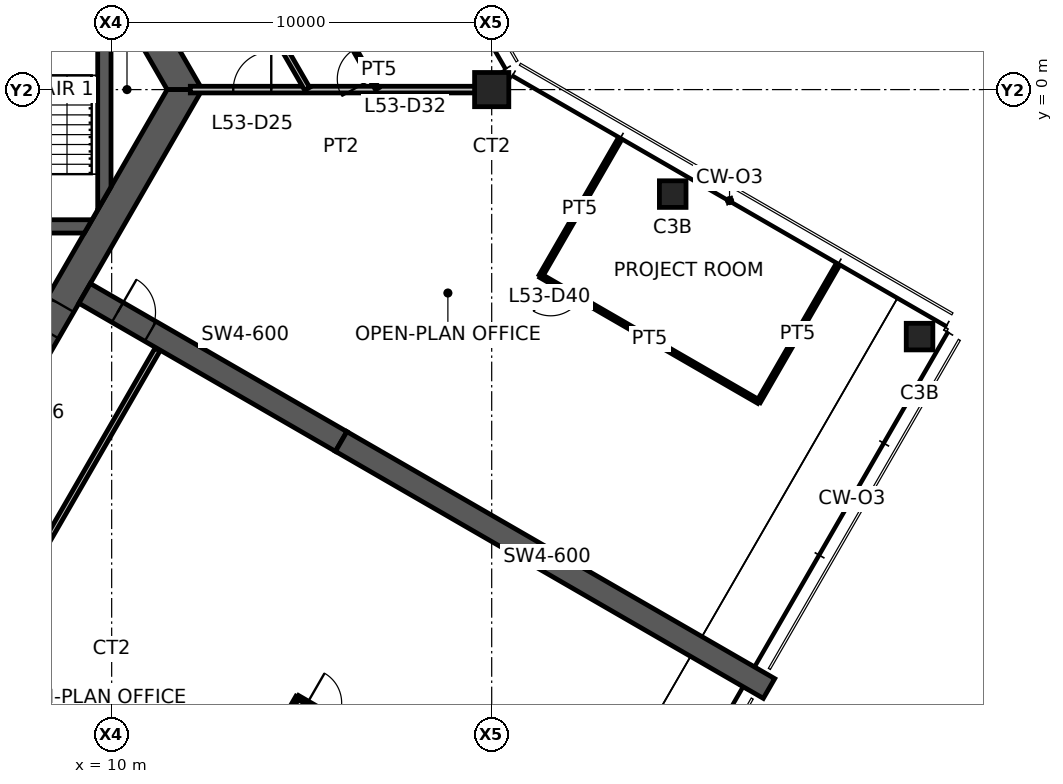
"""IFC4 building model, lengths in metres.
Left out: names, types, materials, properties, quantities, classifications, styles, units other than length and angle.
Written with IfcOpenShell. Run it as: python <this file> out.ifc"""

import sys

from ifc_helpers import new_model, si_unit, direction, frame, frame_2d, origin, origin_2d, place, context, subcontext, project, spatial, polyline, rectangle, hollow_rectangle, outline, extrude, element, fill, save


model = new_model("IFC4")
c1 = context("Model", 3, precision=1e-05, world=origin(), true_north=direction((0.0, 1.0)))
c2 = subcontext(c1, "Body", "Model", "MODEL_VIEW")
j1 = project(units=[si_unit("LENGTHUNIT", "METRE"), si_unit("PLANEANGLEUNIT", "RADIAN")], contexts=[c1])
p1 = place(None, origin())
s1 = spatial("IfcSite", under=j1, at=p1, CompositionType="ELEMENT")
p2 = place(p1, origin())
s2 = spatial("IfcBuilding", under=s1, at=p2, CompositionType="ELEMENT")
p3 = place(p2, frame((0.0, 0.0, 212.8)))
s3 = spatial("IfcBuildingStorey", under=s2, at=p3, CompositionType="ELEMENT", Elevation=212.8)
p4 = place(p3, frame((20.0, 0.0, 0.0), z_axis=(0.0, 0.0, 1.0), x_axis=(1.0, 0.0, 0.0)))
e1 = element("IfcColumn", 1, at=p4, inside=s3, PredefinedType="COLUMN", context=c2, shape_type="SweptSolid", body=[
    extrude(hollow_rectangle(XDim=0.9, YDim=0.9, WallThickness=0.09, at=origin_2d()), origin(), (0.0, 0.0, 1.0), 3.9),
])
for number, where, z_axis, x_axis in (
    (2, (24.763, -2.75, 0.0), (0.0, 0.0, 1.0), (1.0, 0.0, 0.0)),
    (3, (31.258, -6.5, 0.0), (0.0, 0.0, 1.0), (1.0, 0.0, 0.0)),
):
    element("IfcColumn", number, at=place(p3, frame(where, z_axis=z_axis, x_axis=x_axis)), inside=s3, PredefinedType="COLUMN", context=c2, shape_type="SweptSolid", body=[
        extrude(hollow_rectangle(XDim=0.7, YDim=0.7, WallThickness=0.036, at=origin_2d()), origin(), (0.0, 0.0, 1.0), 3.9),
    ])
p5 = place(p3, frame((11.922, 0.0, 0.0), z_axis=(0.0, 0.0, 1.0), x_axis=(-0.500004296715, 0.866022923061, 0.0)))
e4 = element("IfcWall", 4, at=p5, inside=s3, PredefinedType="SHEAR", context=c2, shape_type="SweptSolid", body=[
    extrude(outline(polyline([(-0.231, -0.4), (5.835, -0.4), (6.635, -0.4), (12.153, -0.4), (11.691, 0.4), (6.635, 0.4), (5.835, 0.4), (0.231, 0.4), (-0.231, -0.4)])), origin(), (0.0, 0.0, 1.0), 3.9),
])
p6 = place(p5, frame((5.835, 0.0, 0.0)))
e5 = element("IfcOpeningElement", 5, at=p6, cuts=e4, PredefinedType="OPENING", context=c2, shape_type="SweptSolid", body=[
    extrude(rectangle(XDim=0.8, YDim=2.1, at=frame_2d((0.4, 1.05))), frame((0.0, 0.41, 0.0), z_axis=(0.0, -1.0, 0.0), x_axis=(1.0, 0.0, 0.0)), (0.0, 0.0, 1.0), 0.82),
])
p7 = place(p3, frame((5.961, -10.325, 0.0), z_axis=(0.0, 0.0, 1.0), x_axis=(0.500004296715, 0.866022923061, 0.0)))
e6 = element("IfcWall", 6, at=p7, inside=s3, PredefinedType="SHEAR", context=c2, shape_type="SweptSolid", body=[
    extrude(outline(polyline([(-0.231, -0.4), (4.594, -0.4), (5.394, -0.4), (12.153, -0.4), (11.691, 0.4), (5.394, 0.4), (4.594, 0.4), (0.231, 0.4), (-0.231, -0.4)])), origin(), (0.0, 0.0, 1.0), 3.9),
])
p8 = place(p7, frame((4.594, 0.0, 0.0)))
e7 = element("IfcOpeningElement", 7, at=p8, cuts=e6, PredefinedType="OPENING", context=c2, shape_type="SweptSolid", body=[
    extrude(rectangle(XDim=0.8, YDim=2.1, at=frame_2d((0.4, 1.05))), frame((0.0, 0.41, 0.0), z_axis=(0.0, -1.0, 0.0), x_axis=(1.0, 0.0, 0.0)), (0.0, 0.0, 1.0), 0.82),
])
p9 = place(p3, frame((9.288, -5.363, 0.0), z_axis=(0.0, 0.0, 1.0), x_axis=(0.866031736626, -0.499989031036, 0.0)))
e8 = element("IfcWall", 8, at=p9, inside=s3, PredefinedType="SHEAR", context=c2, shape_type="SweptSolid", body=[
    extrude(rectangle(XDim=7.796, YDim=0.6, at=frame_2d((3.898, 0.0))), origin(), (0.0, 0.0, 1.0), 3.9),
])
p10 = place(p9, frame((1.0, 0.0, 0.0)))
e9 = element("IfcOpeningElement", 9, at=p10, cuts=e8, PredefinedType="OPENING", context=c2, shape_type="SweptSolid", body=[
    extrude(rectangle(XDim=1.0, YDim=2.1, at=frame_2d((0.5, 1.05))), frame((0.0, 0.31, 0.0), z_axis=(0.0, -1.0, 0.0), x_axis=(1.0, 0.0, 0.0)), (0.0, 0.0, 1.0), 0.62),
])
p11 = place(p3, frame((16.039, -9.26, 0.0), z_axis=(0.0, 0.0, 1.0), x_axis=(0.866024837091, -0.50000098154, 0.0)))
e10 = element("IfcWall", 10, at=p11, inside=s3, PredefinedType="SHEAR", context=c2, shape_type="SweptSolid", body=[
    extrude(rectangle(XDim=13.0, YDim=0.6, at=frame_2d((6.5, 0.0))), origin(), (0.0, 0.0, 1.0), 3.9),
])
p12 = place(p3, frame((1.425, -3.6, 0.0), z_axis=(0.0, 0.0, 1.0), x_axis=(1.0, 0.0, 0.0)))
e11 = element("IfcWall", 11, at=p12, inside=s3, PredefinedType="SHEAR", context=c2, shape_type="SweptSolid", body=[
    extrude(outline(polyline([(0.0, -0.175), (1.075, -0.175), (2.175, -0.175), (7.856, -0.175), (8.058, 0.175), (2.175, 0.175), (1.075, 0.175), (0.0, 0.175), (0.0, -0.175)])), origin(), (0.0, 0.0, 1.0), 3.9),
])
p13 = place(p12, frame((1.075, 0.0, 0.0)))
e12 = element("IfcOpeningElement", 12, at=p13, cuts=e11, PredefinedType="OPENING", context=c2, shape_type="SweptSolid", body=[
    extrude(rectangle(XDim=1.1, YDim=2.1, at=frame_2d((0.55, 1.05))), frame((0.0, 0.185, 0.0), z_axis=(0.0, -1.0, 0.0), x_axis=(1.0, 0.0, 0.0)), (0.0, 0.0, 1.0), 0.37),
])
p14 = place(p3, frame((9.808, -2.862, 0.0), z_axis=(0.0, 0.0, 1.0), x_axis=(0.0, 1.0, 0.0)))
e13 = element("IfcWall", 13, at=p14, inside=s3, PredefinedType="SHEAR", context=c2, shape_type="SweptSolid", body=[
    extrude(outline(polyline([(0.303, -0.175), (5.421, -0.175), (6.028, 0.175), (-0.303, 0.175), (0.303, -0.175)])), origin(), (0.0, 0.0, 1.0), 3.9),
])
p15 = place(p3, frame((12.07, 0.0, 0.0), z_axis=(0.0, 0.0, 1.0), x_axis=(1.0, 0.0, 0.0)))
e14 = element("IfcWall", 14, at=p15, inside=s3, PredefinedType="PARTITIONING", context=c2, shape_type="SweptSolid", body=[
    extrude(rectangle(XDim=7.93, YDim=0.175, at=frame_2d((3.965, 0.0))), origin(), (0.0, 0.0, 1.0), 3.05),
])
p16 = place(p15, frame((1.13, 0.0, 0.0)))
e15 = element("IfcOpeningElement", 15, at=p16, cuts=e14, PredefinedType="OPENING", context=c2, shape_type="SweptSolid", body=[
    extrude(rectangle(XDim=1.0, YDim=2.1, at=frame_2d((0.5, 1.05))), frame((0.0, 0.098, 0.0), z_axis=(0.0, -1.0, 0.0), x_axis=(1.0, 0.0, 0.0)), (0.0, 0.0, 1.0), 0.195),
])
p17 = place(p3, frame((10.664, 7.779, 0.0), z_axis=(0.0, 0.0, 1.0), x_axis=(0.49999608499, -0.866027664105, 0.0)))
e16 = element("IfcWall", 16, at=p17, inside=s3, PredefinedType="PARTITIONING", context=c2, shape_type="SweptSolid", body=[
    extrude(rectangle(XDim=8.959, YDim=0.15, at=frame_2d((4.479, 0.0))), origin(), (0.0, 0.0, 1.0), 2.95),
])
p18 = place(p17, frame((3.979, 0.0, 0.0)))
e17 = element("IfcOpeningElement", 17, at=p18, cuts=e16, PredefinedType="OPENING", context=c2, shape_type="SweptSolid", body=[
    extrude(rectangle(XDim=1.0, YDim=2.1, at=frame_2d((0.5, 1.05))), frame((0.0, 0.085, 0.0), z_axis=(0.0, -1.0, 0.0), x_axis=(1.0, 0.0, 0.0)), (0.0, 0.0, 1.0), 0.17),
])
p19 = place(p3, frame((16.986, 0.02, 0.0), z_axis=(0.0, 0.0, 1.0), x_axis=(-0.497993381906, 0.867180829803, 0.0)))
e18 = element("IfcWall", 18, at=p19, inside=s3, PredefinedType="PARTITIONING", context=c2, shape_type="SweptSolid", body=[
    extrude(rectangle(XDim=2.026, YDim=0.1, at=frame_2d((1.013, 0.0))), origin(), (0.0, 0.0, 1.0), 2.95),
])
p20 = place(p19, frame((0.3, 0.0, 0.0)))
e19 = element("IfcOpeningElement", 19, at=p20, cuts=e18, PredefinedType="OPENING", context=c2, shape_type="SweptSolid", body=[
    extrude(rectangle(XDim=0.9, YDim=2.1, at=frame_2d((0.45, 1.05))), frame((0.0, 0.06, 0.0), z_axis=(0.0, -1.0, 0.0), x_axis=(1.0, 0.0, 0.0)), (0.0, 0.0, 1.0), 0.12),
])
p21 = place(p3, frame((21.292, -4.903, 0.0), z_axis=(0.0, 0.0, 1.0), x_axis=(0.500000428765, 0.866025156237, 0.0)))
e20 = element("IfcWall", 20, at=p21, inside=s3, PredefinedType="PARTITIONING", context=c2, shape_type="SweptSolid", body=[
    extrude(rectangle(XDim=4.08, YDim=0.1, at=frame_2d((2.04, 0.0))), origin(), (0.0, 0.0, 1.0), 2.95),
])
p22 = place(p3, frame((27.025, -8.213, 0.0), z_axis=(0.0, 0.0, 1.0), x_axis=(-0.866021597574, 0.500006592492, 0.0)))
e21 = element("IfcWall", 21, at=p22, inside=s3, PredefinedType="PARTITIONING", context=c2, shape_type="SweptSolid", body=[
    extrude(rectangle(XDim=6.62, YDim=0.1, at=frame_2d((3.31, 0.0))), origin(), (0.0, 0.0, 1.0), 2.95),
])
p23 = place(p22, frame((5.42, 0.0, 0.0)))
e22 = element("IfcOpeningElement", 22, at=p23, cuts=e21, PredefinedType="OPENING", context=c2, shape_type="SweptSolid", body=[
    extrude(rectangle(XDim=0.9, YDim=2.1, at=frame_2d((0.45, 1.05))), frame((0.0, 0.06, 0.0), z_axis=(0.0, -1.0, 0.0), x_axis=(1.0, 0.0, 0.0)), (0.0, 0.0, 1.0), 0.12),
])
p24 = place(p3, frame((29.08, -4.653, 0.0), z_axis=(0.0, 0.0, 1.0), x_axis=(-0.500010383074, -0.866019409031, 0.0)))
e23 = element("IfcWall", 23, at=p24, inside=s3, PredefinedType="PARTITIONING", context=c2, shape_type="SweptSolid", body=[
    extrude(rectangle(XDim=4.11, YDim=0.1, at=frame_2d((2.055, 0.0))), origin(), (0.0, 0.0, 1.0), 2.95),
])
p25 = place(p3, frame((11.207, -6.84, 0.0), z_axis=(0.0, 0.0, 1.0), x_axis=(-0.500002959843, -0.866023694911, 0.0)))
e24 = element("IfcWall", 24, at=p25, inside=s3, PredefinedType="PARTITIONING", context=c2, shape_type="SweptSolid", body=[
    extrude(rectangle(XDim=7.258, YDim=0.15, at=frame_2d((3.629, 0.0))), origin(), (0.0, 0.0, 1.0), 2.95),
])
p26 = place(p3, frame((12.837, -19.548, 0.0), z_axis=(0.0, 0.0, 1.0), x_axis=(0.499965833383, 0.866045128991, 0.0)))
e25 = element("IfcWall", 25, at=p26, inside=s3, PredefinedType="PARTITIONING", context=c2, shape_type="SweptSolid", body=[
    extrude(rectangle(XDim=4.11, YDim=0.1, at=frame_2d((2.055, 0.0))), origin(), (0.0, 0.0, 1.0), 2.95),
])
p27 = place(p3, frame((14.892, -15.988, 0.0), z_axis=(0.0, 0.0, 1.0), x_axis=(0.866030817826, -0.499990622488, 0.0)))
e26 = element("IfcWall", 26, at=p27, inside=s3, PredefinedType="PARTITIONING", context=c2, shape_type="SweptSolid", body=[
    extrude(rectangle(XDim=6.62, YDim=0.1, at=frame_2d((3.31, 0.0))), origin(), (0.0, 0.0, 1.0), 2.95),
])
p28 = place(p27, frame((0.3, 0.0, 0.0)))
e27 = element("IfcOpeningElement", 27, at=p28, cuts=e26, PredefinedType="OPENING", context=c2, shape_type="SweptSolid", body=[
    extrude(rectangle(XDim=0.9, YDim=2.1, at=frame_2d((0.45, 1.05))), frame((0.0, 0.06, 0.0), z_axis=(0.0, -1.0, 0.0), x_axis=(1.0, 0.0, 0.0)), (0.0, 0.0, 1.0), 0.12),
])
p29 = place(p8, origin())
e28 = element("IfcDoor", 28, at=p29, inside=s3, OperationType="SINGLE_SWING_LEFT", PredefinedType="DOOR", context=c2, shape_type="SweptSolid", body=[
    extrude(rectangle(XDim=0.8, YDim=2.1, at=frame_2d((0.4, 1.05))), frame((0.0, 0.025, 0.0), z_axis=(0.0, -1.0, 0.0), x_axis=(1.0, 0.0, 0.0)), (0.0, 0.0, 1.0), 0.05),
])
fill(e7, e28)
p30 = place(p10, origin())
e29 = element("IfcDoor", 29, at=p30, inside=s3, OperationType="SINGLE_SWING_LEFT", PredefinedType="DOOR", context=c2, shape_type="SweptSolid", body=[
    extrude(rectangle(XDim=1.0, YDim=2.1, at=frame_2d((0.5, 1.05))), frame((0.0, 0.025, 0.0), z_axis=(0.0, -1.0, 0.0), x_axis=(1.0, 0.0, 0.0)), (0.0, 0.0, 1.0), 0.05),
])
fill(e9, e29)
p31 = place(p16, origin())
e30 = element("IfcDoor", 30, at=p31, inside=s3, OperationType="SINGLE_SWING_RIGHT", PredefinedType="DOOR", context=c2, shape_type="SweptSolid", body=[
    extrude(rectangle(XDim=1.0, YDim=2.1, at=frame_2d((0.5, 1.05))), frame((0.0, 0.025, 0.0), z_axis=(0.0, -1.0, 0.0), x_axis=(1.0, 0.0, 0.0)), (0.0, 0.0, 1.0), 0.05),
])
fill(e15, e30)
p32 = place(p20, origin())
e31 = element("IfcDoor", 31, at=p32, inside=s3, OperationType="SINGLE_SWING_LEFT", PredefinedType="DOOR", context=c2, shape_type="SweptSolid", body=[
    extrude(rectangle(XDim=0.9, YDim=2.1, at=frame_2d((0.45, 1.05))), frame((0.0, 0.025, 0.0), z_axis=(0.0, -1.0, 0.0), x_axis=(1.0, 0.0, 0.0)), (0.0, 0.0, 1.0), 0.05),
])
fill(e19, e31)
p33 = place(p23, origin())
e32 = element("IfcDoor", 32, at=p33, inside=s3, OperationType="SINGLE_SWING_RIGHT", PredefinedType="DOOR", context=c2, shape_type="SweptSolid", body=[
    extrude(rectangle(XDim=0.9, YDim=2.1, at=frame_2d((0.45, 1.05))), frame((0.0, 0.025, 0.0), z_axis=(0.0, -1.0, 0.0), x_axis=(1.0, 0.0, 0.0)), (0.0, 0.0, 1.0), 0.05),
])
fill(e22, e32)
p34 = place(p28, origin())
e33 = element("IfcDoor", 33, at=p34, inside=s3, OperationType="SINGLE_SWING_LEFT", PredefinedType="DOOR", context=c2, shape_type="SweptSolid", body=[
    extrude(rectangle(XDim=0.9, YDim=2.1, at=frame_2d((0.45, 1.05))), frame((0.0, 0.025, 0.0), z_axis=(0.0, -1.0, 0.0), x_axis=(1.0, 0.0, 0.0)), (0.0, 0.0, 1.0), 0.05),
])
fill(e27, e33)
save(model, sys.argv[1])
